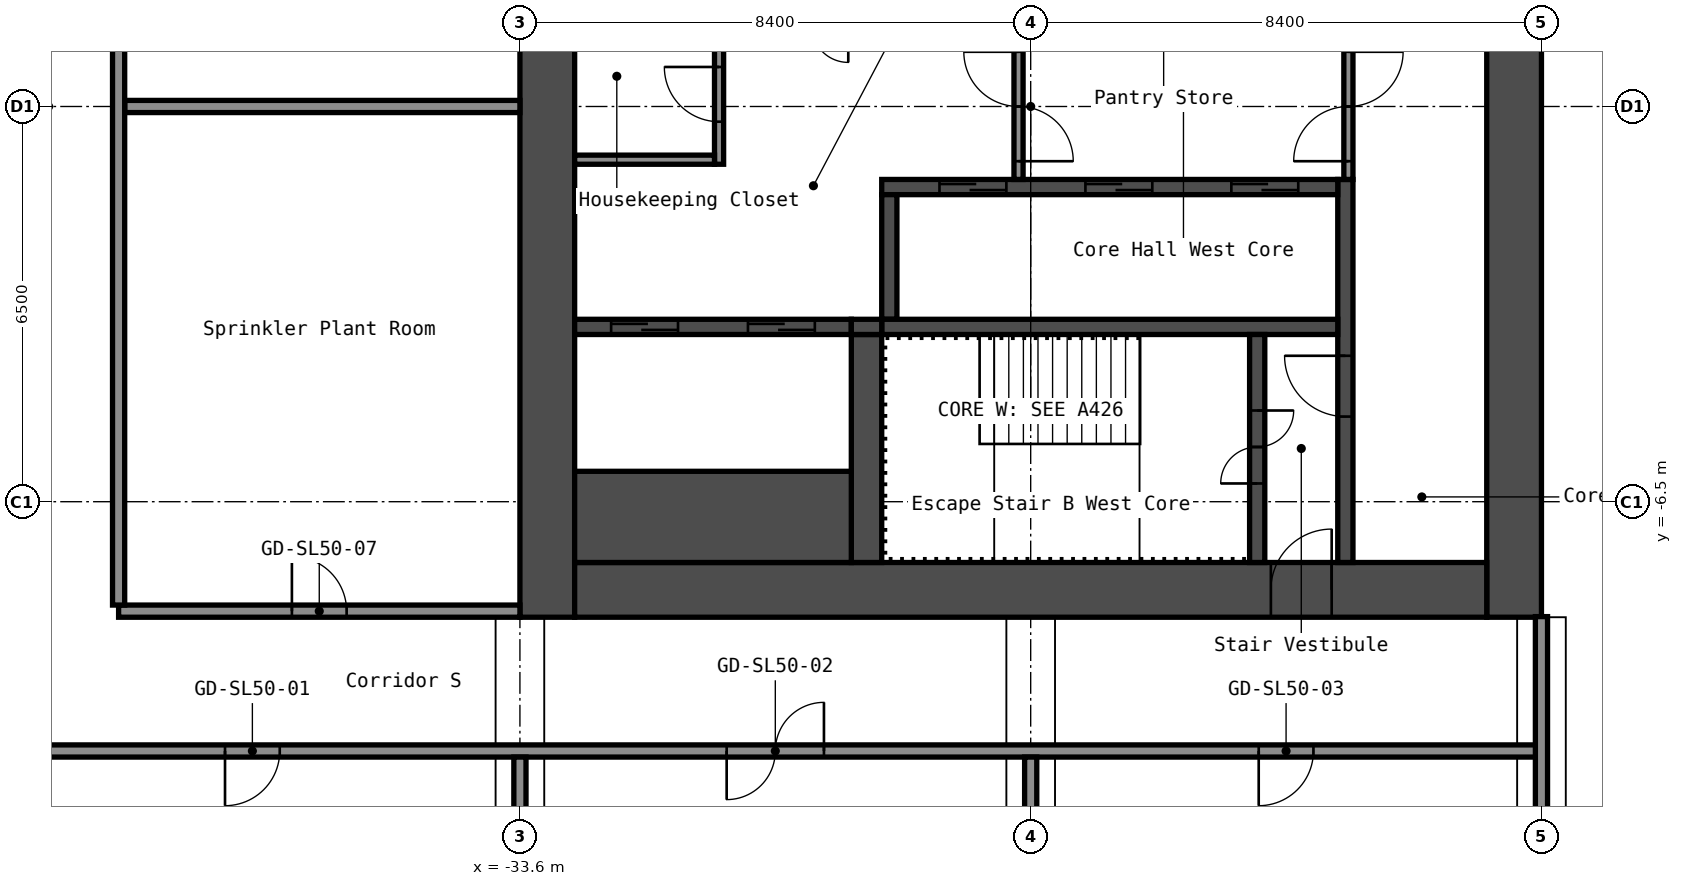
"""IFC4 building model, lengths in metres.
Left out: names, types, materials, properties, quantities, classifications, styles, units other than length and angle.
Written with IfcOpenShell. Run it as: python <this file> out.ifc"""

import sys

from ifc_helpers import new_model, si_unit, direction, frame, frame_2d, origin, place, context, subcontext, project, spatial, rectangle, extrude, element, fill, save


model = new_model("IFC4")
c1 = context("Model", 3, precision=1e-05, world=origin(), true_north=direction((0.0, 1.0)))
c2 = subcontext(c1, "Body", "Model", "MODEL_VIEW")
j1 = project(units=[si_unit("LENGTHUNIT", "METRE"), si_unit("PLANEANGLEUNIT", "RADIAN")], contexts=[c1])
p1 = place(None, origin())
s1 = spatial("IfcSite", under=j1, at=p1, CompositionType="ELEMENT")
p2 = place(p1, origin())
s2 = spatial("IfcBuilding", under=s1, at=p2, CompositionType="ELEMENT")
p3 = place(p2, frame((0.0, 0.0, 175.8)))
s3 = spatial("IfcBuildingStorey", under=s2, at=p3, CompositionType="ELEMENT", Elevation=175.8)
p4 = place(p3, frame((-17.25, -8.4, 0.0), z_axis=(0.0, 0.0, 1.0), x_axis=(0.0, 1.0, 0.0)))
e1 = element("IfcWall", 1, at=p4, inside=s3, PredefinedType="SHEAR", context=c2, shape_type="SweptSolid", body=[
    extrude(rectangle(XDim=16.8, YDim=0.9, at=frame_2d((8.4, 0.0))), origin(), (0.0, 0.0, 1.0), 4.1),
])
p5 = place(p4, frame((10.1, 0.0, 0.0)))
e2 = element("IfcOpeningElement", 2, at=p5, cuts=e1, PredefinedType="OPENING", context=c2, shape_type="SweptSolid", body=[
    extrude(rectangle(XDim=1.6, YDim=2.1, at=frame_2d((0.8, 1.05))), frame((0.0, 0.46, 0.0), z_axis=(0.0, -1.0, 0.0), x_axis=(1.0, 0.0, 0.0)), (0.0, 0.0, 1.0), 0.92),
])
p6 = place(p3, frame((-33.15, -8.4, 0.0), z_axis=(0.0, 0.0, 1.0), x_axis=(0.0, 1.0, 0.0)))
e3 = element("IfcWall", 3, at=p6, inside=s3, PredefinedType="SHEAR", context=c2, shape_type="SweptSolid", body=[
    extrude(rectangle(XDim=16.8, YDim=0.9, at=frame_2d((8.4, 0.0))), origin(), (0.0, 0.0, 1.0), 4.1),
])
p7 = place(p3, frame((-32.7, -7.95, 0.0), z_axis=(0.0, 0.0, 1.0), x_axis=(1.0, 0.0, 0.0)))
e4 = element("IfcWall", 4, at=p7, inside=s3, PredefinedType="SHEAR", context=c2, shape_type="SweptSolid", body=[
    extrude(rectangle(XDim=15.0, YDim=0.9, at=frame_2d((7.5, 0.0))), origin(), (0.0, 0.0, 1.0), 4.1),
])
p8 = place(p7, frame((11.45, 0.0, 0.0)))
e5 = element("IfcOpeningElement", 5, at=p8, cuts=e4, PredefinedType="OPENING", context=c2, shape_type="SweptSolid", body=[
    extrude(rectangle(XDim=1.0, YDim=2.1, at=frame_2d((0.5, 1.05))), frame((0.0, 0.46, 0.0), z_axis=(0.0, -1.0, 0.0), x_axis=(1.0, 0.0, 0.0)), (0.0, 0.0, 1.0), 0.92),
])
p9 = place(p3, frame((-20.025, -7.5, 0.0), z_axis=(0.0, 0.0, 1.0), x_axis=(0.0, 1.0, 0.0)))
e6 = element("IfcWall", 6, at=p9, inside=s3, PredefinedType="SHEAR", context=c2, shape_type="SweptSolid", body=[
    extrude(rectangle(XDim=6.3, YDim=0.25, at=frame_2d((3.15, 0.0))), origin(), (0.0, 0.0, 1.0), 4.1),
])
p10 = place(p9, frame((2.4, 0.0, 0.0)))
e7 = element("IfcOpeningElement", 7, at=p10, cuts=e6, PredefinedType="OPENING", context=c2, shape_type="SweptSolid", body=[
    extrude(rectangle(XDim=1.0, YDim=2.1, at=frame_2d((0.5, 1.05))), frame((0.0, 0.135, 0.0), z_axis=(0.0, -1.0, 0.0), x_axis=(1.0, 0.0, 0.0)), (0.0, 0.0, 1.0), 0.27),
])
p11 = place(p3, frame((-27.65, -1.325, 0.0), z_axis=(0.0, 0.0, 1.0), x_axis=(1.0, 0.0, 0.0)))
e8 = element("IfcWall", 8, at=p11, inside=s3, PredefinedType="SHEAR", context=c2, shape_type="SweptSolid", body=[
    extrude(rectangle(XDim=7.5, YDim=0.25, at=frame_2d((3.75, 0.0))), origin(), (0.0, 0.0, 1.0), 4.1),
])
p12 = place(p11, frame((5.75, 0.0, 0.0)))
e9 = element("IfcOpeningElement", 9, at=p12, cuts=e8, PredefinedType="OPENING", context=c2, shape_type="SweptSolid", body=[
    extrude(rectangle(XDim=1.1, YDim=2.1, at=frame_2d((0.55, 1.05))), frame((0.0, 0.135, 0.0), z_axis=(0.0, -1.0, 0.0), x_axis=(1.0, 0.0, 0.0)), (0.0, 0.0, 1.0), 0.27),
])
p13 = place(p11, frame((3.35, 0.0, 0.0)))
e10 = element("IfcOpeningElement", 10, at=p13, cuts=e8, PredefinedType="OPENING", context=c2, shape_type="SweptSolid", body=[
    extrude(rectangle(XDim=1.1, YDim=2.1, at=frame_2d((0.55, 1.05))), frame((0.0, 0.135, 0.0), z_axis=(0.0, -1.0, 0.0), x_axis=(1.0, 0.0, 0.0)), (0.0, 0.0, 1.0), 0.27),
])
p14 = place(p11, frame((0.95, 0.0, 0.0)))
e11 = element("IfcOpeningElement", 11, at=p14, cuts=e8, PredefinedType="OPENING", context=c2, shape_type="SweptSolid", body=[
    extrude(rectangle(XDim=1.1, YDim=2.1, at=frame_2d((0.55, 1.05))), frame((0.0, 0.135, 0.0), z_axis=(0.0, -1.0, 0.0), x_axis=(1.0, 0.0, 0.0)), (0.0, 0.0, 1.0), 0.27),
])
p15 = place(p3, frame((-27.525, -3.5, 0.0), z_axis=(0.0, 0.0, 1.0), x_axis=(0.0, 1.0, 0.0)))
e12 = element("IfcWall", 12, at=p15, inside=s3, PredefinedType="SHEAR", context=c2, shape_type="SweptSolid", body=[
    extrude(rectangle(XDim=2.05, YDim=0.25, at=frame_2d((1.025, 0.0))), origin(), (0.0, 0.0, 1.0), 4.1),
])
p16 = place(p3, frame((-27.65, -3.625, 0.0), z_axis=(0.0, 0.0, 1.0), x_axis=(1.0, 0.0, 0.0)))
e13 = element("IfcWall", 13, at=p16, inside=s3, PredefinedType="SHEAR", context=c2, shape_type="SweptSolid", body=[
    extrude(rectangle(XDim=7.5, YDim=0.25, at=frame_2d((3.75, 0.0))), origin(), (0.0, 0.0, 1.0), 4.1),
])
p17 = place(p3, frame((-21.475, -7.5, 0.0), z_axis=(0.0, 0.0, 1.0), x_axis=(0.0, 1.0, 0.0)))
e14 = element("IfcWall", 14, at=p17, inside=s3, PredefinedType="SHEAR", context=c2, shape_type="SweptSolid", body=[
    extrude(rectangle(XDim=3.75, YDim=0.25, at=frame_2d((1.875, 0.0))), origin(), (0.0, 0.0, 1.0), 4.1),
])
p18 = place(p17, frame((1.3, 0.0, 0.0)))
e15 = element("IfcOpeningElement", 15, at=p18, cuts=e14, PredefinedType="OPENING", context=c2, shape_type="SweptSolid", body=[
    extrude(rectangle(XDim=1.2, YDim=2.1, at=frame_2d((0.6, 1.05))), frame((0.0, 0.135, 0.0), z_axis=(0.0, -1.0, 0.0), x_axis=(1.0, 0.0, 0.0)), (0.0, 0.0, 1.0), 0.27),
])
p19 = place(p3, frame((-27.9, -7.5, 0.0), z_axis=(0.0, 0.0, 1.0), x_axis=(0.0, 1.0, 0.0)))
e16 = element("IfcWall", 16, at=p19, inside=s3, PredefinedType="SHEAR", context=c2, shape_type="SweptSolid", body=[
    extrude(rectangle(XDim=3.75, YDim=0.5, at=frame_2d((1.875, 0.0))), origin(), (0.0, 0.0, 1.0), 4.1),
])
p20 = place(p3, frame((-32.7, -3.625, 0.0), z_axis=(0.0, 0.0, 1.0), x_axis=(1.0, 0.0, 0.0)))
e17 = element("IfcWall", 17, at=p20, inside=s3, PredefinedType="SHEAR", context=c2, shape_type="SweptSolid", body=[
    extrude(rectangle(XDim=4.55, YDim=0.25, at=frame_2d((2.275, 0.0))), origin(), (0.0, 0.0, 1.0), 4.1),
])
p21 = place(p20, frame((2.85, 0.0, 0.0)))
e18 = element("IfcOpeningElement", 18, at=p21, cuts=e17, PredefinedType="OPENING", context=c2, shape_type="SweptSolid", body=[
    extrude(rectangle(XDim=1.1, YDim=2.1, at=frame_2d((0.55, 1.05))), frame((0.0, 0.135, 0.0), z_axis=(0.0, -1.0, 0.0), x_axis=(1.0, 0.0, 0.0)), (0.0, 0.0, 1.0), 0.27),
])
p22 = place(p20, frame((0.6, 0.0, 0.0)))
e19 = element("IfcOpeningElement", 19, at=p22, cuts=e17, PredefinedType="OPENING", context=c2, shape_type="SweptSolid", body=[
    extrude(rectangle(XDim=1.1, YDim=2.1, at=frame_2d((0.55, 1.05))), frame((0.0, 0.135, 0.0), z_axis=(0.0, -1.0, 0.0), x_axis=(1.0, 0.0, 0.0)), (0.0, 0.0, 1.0), 0.27),
])
p23 = place(p3, frame((-32.7, -6.75, 0.0), z_axis=(0.0, 0.0, 1.0), x_axis=(1.0, 0.0, 0.0)))
e20 = element("IfcWall", 20, at=p23, inside=s3, PredefinedType="SHEAR", context=c2, shape_type="SweptSolid", body=[
    extrude(rectangle(XDim=4.55, YDim=1.5, at=frame_2d((2.275, 0.0))), origin(), (0.0, 0.0, 1.0), 4.1),
])
p24 = place(p3, frame((-28.15, -3.625, 0.0), z_axis=(0.0, 0.0, 1.0), x_axis=(1.0, 0.0, 0.0)))
e21 = element("IfcWall", 21, at=p24, inside=s3, PredefinedType="SHEAR", context=c2, shape_type="SweptSolid", body=[
    extrude(rectangle(XDim=0.5, YDim=0.25, at=frame_2d((0.25, 0.0))), origin(), (0.0, 0.0, 1.0), 4.1),
])
p25 = place(p3, frame((-19.975, -1.2, 0.0), z_axis=(0.0, 0.0, 1.0), x_axis=(0.0, 1.0, 0.0)))
e22 = element("IfcWall", 22, at=p25, inside=s3, PredefinedType="PARTITIONING", context=c2, shape_type="SweptSolid", body=[
    extrude(rectangle(XDim=2.4, YDim=0.15, at=frame_2d((1.2, 0.0))), origin(), (0.0, 0.0, 1.0), 4.1),
])
p26 = place(p25, frame((0.3, 0.0, 0.0)))
e23 = element("IfcOpeningElement", 23, at=p26, cuts=e22, PredefinedType="OPENING", context=c2, shape_type="SweptSolid", body=[
    extrude(rectangle(XDim=1.8, YDim=2.1, at=frame_2d((0.9, 1.05))), frame((0.0, 0.085, 0.0), z_axis=(0.0, -1.0, 0.0), x_axis=(1.0, 0.0, 0.0)), (0.0, 0.0, 1.0), 0.17),
])
p27 = place(p3, frame((-25.4, -1.2, 0.0), z_axis=(0.0, 0.0, 1.0), x_axis=(0.0, 1.0, 0.0)))
e24 = element("IfcWall", 24, at=p27, inside=s3, PredefinedType="PARTITIONING", context=c2, shape_type="SweptSolid", body=[
    extrude(rectangle(XDim=2.4, YDim=0.15, at=frame_2d((1.2, 0.0))), origin(), (0.0, 0.0, 1.0), 4.1),
])
p28 = place(p27, frame((0.3, 0.0, 0.0)))
e25 = element("IfcOpeningElement", 25, at=p28, cuts=e24, PredefinedType="OPENING", context=c2, shape_type="SweptSolid", body=[
    extrude(rectangle(XDim=1.8, YDim=2.1, at=frame_2d((0.9, 1.05))), frame((0.0, 0.085, 0.0), z_axis=(0.0, -1.0, 0.0), x_axis=(1.0, 0.0, 0.0)), (0.0, 0.0, 1.0), 0.17),
])
p29 = place(p3, frame((-30.325, -0.95, 0.0), z_axis=(0.0, 0.0, 1.0), x_axis=(0.0, 1.0, 0.0)))
e26 = element("IfcWall", 26, at=p29, inside=s3, PredefinedType="PARTITIONING", context=c2, shape_type="SweptSolid", body=[
    extrude(rectangle(XDim=2.15, YDim=0.15, at=frame_2d((1.075, 0.0))), origin(), (0.0, 0.0, 1.0), 4.1),
])
p30 = place(p29, frame((0.7, 0.0, 0.0)))
e27 = element("IfcOpeningElement", 27, at=p30, cuts=e26, PredefinedType="OPENING", context=c2, shape_type="SweptSolid", body=[
    extrude(rectangle(XDim=0.9, YDim=2.1, at=frame_2d((0.45, 1.05))), frame((0.0, 0.085, 0.0), z_axis=(0.0, -1.0, 0.0), x_axis=(1.0, 0.0, 0.0)), (0.0, 0.0, 1.0), 0.17),
])
p31 = place(p3, frame((-32.7, -0.875, 0.0), z_axis=(0.0, 0.0, 1.0), x_axis=(1.0, 0.0, 0.0)))
e28 = element("IfcWall", 28, at=p31, inside=s3, PredefinedType="PARTITIONING", context=c2, shape_type="SweptSolid", body=[
    extrude(rectangle(XDim=2.3, YDim=0.15, at=frame_2d((1.15, 0.0))), origin(), (0.0, 0.0, 1.0), 4.1),
])
p32 = place(p3, frame((-42.7, -10.6, 0.0), z_axis=(0.0, 0.0, 1.0), x_axis=(1.0, 0.0, 0.0)))
e29 = element("IfcWall", 29, at=p32, inside=s3, PredefinedType="PARTITIONING", context=c2, shape_type="SweptSolid", body=[
    extrude(rectangle(XDim=25.9, YDim=0.2, at=frame_2d((12.95, 0.0))), origin(), (0.0, 0.0, 1.0), 4.1),
])
p33 = place(p32, frame((4.25, 0.0, 0.0)))
e30 = element("IfcOpeningElement", 30, at=p33, cuts=e29, PredefinedType="OPENING", context=c2, shape_type="SweptSolid", body=[
    extrude(rectangle(XDim=0.9, YDim=2.1, at=frame_2d((0.45, 1.05))), frame((0.0, 0.11, 0.0), z_axis=(0.0, -1.0, 0.0), x_axis=(1.0, 0.0, 0.0)), (0.0, 0.0, 1.0), 0.22),
])
p34 = place(p32, frame((12.5, 0.0, 0.0)))
e31 = element("IfcOpeningElement", 31, at=p34, cuts=e29, PredefinedType="OPENING", context=c2, shape_type="SweptSolid", body=[
    extrude(rectangle(XDim=1.6, YDim=2.1, at=frame_2d((0.8, 1.05))), frame((0.0, 0.11, 0.0), z_axis=(0.0, -1.0, 0.0), x_axis=(1.0, 0.0, 0.0)), (0.0, 0.0, 1.0), 0.22),
])
p35 = place(p32, frame((21.25, 0.0, 0.0)))
e32 = element("IfcOpeningElement", 32, at=p35, cuts=e29, PredefinedType="OPENING", context=c2, shape_type="SweptSolid", body=[
    extrude(rectangle(XDim=0.9, YDim=2.1, at=frame_2d((0.45, 1.05))), frame((0.0, 0.11, 0.0), z_axis=(0.0, -1.0, 0.0), x_axis=(1.0, 0.0, 0.0)), (0.0, 0.0, 1.0), 0.22),
])
p36 = place(p3, frame((-40.2, -8.3, 0.0), z_axis=(0.0, 0.0, 1.0), x_axis=(1.0, 0.0, 0.0)))
e33 = element("IfcWall", 33, at=p36, inside=s3, PredefinedType="PARTITIONING", context=c2, shape_type="SweptSolid", body=[
    extrude(rectangle(XDim=6.6, YDim=0.2, at=frame_2d((3.3, 0.0))), origin(), (0.0, 0.0, 1.0), 4.1),
])
p37 = place(p36, frame((2.85, 0.0, 0.0)))
e34 = element("IfcOpeningElement", 34, at=p37, cuts=e33, PredefinedType="OPENING", context=c2, shape_type="SweptSolid", body=[
    extrude(rectangle(XDim=0.9, YDim=2.1, at=frame_2d((0.45, 1.05))), frame((0.0, 0.11, 0.0), z_axis=(0.0, -1.0, 0.0), x_axis=(1.0, 0.0, 0.0)), (0.0, 0.0, 1.0), 0.22),
])
p38 = place(p3, frame((-40.1, 0.0, 0.0), z_axis=(0.0, 0.0, 1.0), x_axis=(1.0, 0.0, 0.0)))
e35 = element("IfcWall", 35, at=p38, inside=s3, PredefinedType="PARTITIONING", context=c2, shape_type="SweptSolid", body=[
    extrude(rectangle(XDim=6.5, YDim=0.2, at=frame_2d((3.25, 0.0))), origin(), (0.0, 0.0, 1.0), 4.1),
])
p39 = place(p3, frame((-40.2, -8.2, 0.0), z_axis=(0.0, 0.0, 1.0), x_axis=(0.0, 1.0, 0.0)))
e36 = element("IfcWall", 36, at=p39, inside=s3, PredefinedType="PARTITIONING", context=c2, shape_type="SweptSolid", body=[
    extrude(rectangle(XDim=16.4, YDim=0.2, at=frame_2d((8.2, 0.0))), origin(), (0.0, 0.0, 1.0), 4.1),
])
for number, where, z_axis, x_axis in (
    (37, (-33.6, -19.3, 0.0), (0.0, 0.0, 1.0), (0.0, 1.0, 0.0)),
    (38, (-25.2, -19.3, 0.0), (0.0, 0.0, 1.0), (0.0, 1.0, 0.0)),
):
    element("IfcWall", number, at=place(p3, frame(where, z_axis=z_axis, x_axis=x_axis)), inside=s3, PredefinedType="PARTITIONING", context=c2, shape_type="SweptSolid", body=[
        extrude(rectangle(XDim=8.6, YDim=0.2, at=frame_2d((4.3, 0.0))), origin(), (0.0, 0.0, 1.0), 4.1),
    ])
p40 = place(p3, frame((-16.8, -19.3, 0.0), z_axis=(0.0, 0.0, 1.0), x_axis=(0.0, 1.0, 0.0)))
e39 = element("IfcWall", 39, at=p40, inside=s3, PredefinedType="PARTITIONING", context=c2, shape_type="SweptSolid", body=[
    extrude(rectangle(XDim=10.91, YDim=0.2, at=frame_2d((5.455, 0.0))), origin(), (0.0, 0.0, 1.0), 4.1),
])
p41 = place(p8, origin())
e40 = element("IfcDoor", 40, at=p41, inside=s3, OperationType="SINGLE_SWING_LEFT", PredefinedType="DOOR", context=c2, shape_type="SweptSolid", body=[
    extrude(rectangle(XDim=1.0, YDim=2.1, at=frame_2d((0.5, 1.05))), frame((0.0, 0.025, 0.0), z_axis=(0.0, -1.0, 0.0), x_axis=(1.0, 0.0, 0.0)), (0.0, 0.0, 1.0), 0.05),
])
fill(e5, e40)
p42 = place(p18, origin())
e41 = element("IfcDoor", 41, at=p42, inside=s3, OperationType="DOUBLE_DOOR_SINGLE_SWING", PredefinedType="DOOR", context=c2, shape_type="SweptSolid", body=[
    extrude(rectangle(XDim=1.2, YDim=2.1, at=frame_2d((0.6, 1.05))), frame((0.0, 0.025, 0.0), z_axis=(0.0, -1.0, 0.0), x_axis=(1.0, 0.0, 0.0)), (0.0, 0.0, 1.0), 0.05),
])
fill(e15, e41)
p43 = place(p10, origin())
e42 = element("IfcDoor", 42, at=p43, inside=s3, OperationType="SINGLE_SWING_LEFT", PredefinedType="DOOR", context=c2, shape_type="SweptSolid", body=[
    extrude(rectangle(XDim=1.0, YDim=2.1, at=frame_2d((0.5, 1.05))), frame((0.0, 0.025, 0.0), z_axis=(0.0, -1.0, 0.0), x_axis=(1.0, 0.0, 0.0)), (0.0, 0.0, 1.0), 0.05),
])
fill(e7, e42)
p44 = place(p26, origin())
e43 = element("IfcDoor", 43, at=p44, inside=s3, OperationType="DOUBLE_DOOR_SINGLE_SWING", PredefinedType="DOOR", context=c2, shape_type="SweptSolid", body=[
    extrude(rectangle(XDim=1.8, YDim=2.1, at=frame_2d((0.9, 1.05))), frame((0.0, 0.025, 0.0), z_axis=(0.0, -1.0, 0.0), x_axis=(1.0, 0.0, 0.0)), (0.0, 0.0, 1.0), 0.05),
])
fill(e23, e43)
p45 = place(p28, origin())
e44 = element("IfcDoor", 44, at=p45, inside=s3, OperationType="DOUBLE_DOOR_SINGLE_SWING", PredefinedType="DOOR", context=c2, shape_type="SweptSolid", body=[
    extrude(rectangle(XDim=1.8, YDim=2.1, at=frame_2d((0.9, 1.05))), frame((0.0, 0.025, 0.0), z_axis=(0.0, -1.0, 0.0), x_axis=(1.0, 0.0, 0.0)), (0.0, 0.0, 1.0), 0.05),
])
fill(e25, e44)
p46 = place(p30, origin())
e45 = element("IfcDoor", 45, at=p46, inside=s3, OperationType="SINGLE_SWING_LEFT", PredefinedType="DOOR", context=c2, shape_type="SweptSolid", body=[
    extrude(rectangle(XDim=0.9, YDim=2.1, at=frame_2d((0.45, 1.05))), frame((0.0, 0.025, 0.0), z_axis=(0.0, -1.0, 0.0), x_axis=(1.0, 0.0, 0.0)), (0.0, 0.0, 1.0), 0.05),
])
fill(e27, e45)
p47 = place(p12, origin())
e46 = element("IfcDoor", 46, at=p47, inside=s3, OperationType="DOUBLE_DOOR_SLIDING", PredefinedType="DOOR", context=c2, shape_type="SweptSolid", body=[
    extrude(rectangle(XDim=1.1, YDim=2.1, at=frame_2d((0.55, 1.05))), frame((0.0, 0.025, 0.0), z_axis=(0.0, -1.0, 0.0), x_axis=(1.0, 0.0, 0.0)), (0.0, 0.0, 1.0), 0.05),
])
fill(e9, e46)
p48 = place(p13, origin())
e47 = element("IfcDoor", 47, at=p48, inside=s3, OperationType="DOUBLE_DOOR_SLIDING", PredefinedType="DOOR", context=c2, shape_type="SweptSolid", body=[
    extrude(rectangle(XDim=1.1, YDim=2.1, at=frame_2d((0.55, 1.05))), frame((0.0, 0.025, 0.0), z_axis=(0.0, -1.0, 0.0), x_axis=(1.0, 0.0, 0.0)), (0.0, 0.0, 1.0), 0.05),
])
fill(e10, e47)
p49 = place(p14, origin())
e48 = element("IfcDoor", 48, at=p49, inside=s3, OperationType="DOUBLE_DOOR_SLIDING", PredefinedType="DOOR", context=c2, shape_type="SweptSolid", body=[
    extrude(rectangle(XDim=1.1, YDim=2.1, at=frame_2d((0.55, 1.05))), frame((0.0, 0.025, 0.0), z_axis=(0.0, -1.0, 0.0), x_axis=(1.0, 0.0, 0.0)), (0.0, 0.0, 1.0), 0.05),
])
fill(e11, e48)
p50 = place(p21, origin())
e49 = element("IfcDoor", 49, at=p50, inside=s3, OperationType="DOUBLE_DOOR_SLIDING", PredefinedType="DOOR", context=c2, shape_type="SweptSolid", body=[
    extrude(rectangle(XDim=1.1, YDim=2.1, at=frame_2d((0.55, 1.05))), frame((0.0, 0.025, 0.0), z_axis=(0.0, -1.0, 0.0), x_axis=(1.0, 0.0, 0.0)), (0.0, 0.0, 1.0), 0.05),
])
fill(e18, e49)
p51 = place(p22, origin())
e50 = element("IfcDoor", 50, at=p51, inside=s3, OperationType="DOUBLE_DOOR_SLIDING", PredefinedType="DOOR", context=c2, shape_type="SweptSolid", body=[
    extrude(rectangle(XDim=1.1, YDim=2.1, at=frame_2d((0.55, 1.05))), frame((0.0, 0.025, 0.0), z_axis=(0.0, -1.0, 0.0), x_axis=(1.0, 0.0, 0.0)), (0.0, 0.0, 1.0), 0.05),
])
fill(e19, e50)
p52 = place(p33, origin())
e51 = element("IfcDoor", 51, at=p52, inside=s3, OperationType="SINGLE_SWING_LEFT", PredefinedType="DOOR", context=c2, shape_type="SweptSolid", body=[
    extrude(rectangle(XDim=0.9, YDim=2.1, at=frame_2d((0.45, 1.05))), frame((0.0, 0.025, 0.0), z_axis=(0.0, -1.0, 0.0), x_axis=(1.0, 0.0, 0.0)), (0.0, 0.0, 1.0), 0.05),
])
fill(e30, e51)
p53 = place(p34, origin())
e52 = element("IfcDoor", 52, at=p53, inside=s3, OperationType="DOUBLE_DOOR_SINGLE_SWING", PredefinedType="DOOR", context=c2, shape_type="SweptSolid", body=[
    extrude(rectangle(XDim=1.6, YDim=2.1, at=frame_2d((0.8, 1.05))), frame((0.0, 0.025, 0.0), z_axis=(0.0, -1.0, 0.0), x_axis=(1.0, 0.0, 0.0)), (0.0, 0.0, 1.0), 0.05),
])
fill(e31, e52)
p54 = place(p35, origin())
e53 = element("IfcDoor", 53, at=p54, inside=s3, OperationType="SINGLE_SWING_LEFT", PredefinedType="DOOR", context=c2, shape_type="SweptSolid", body=[
    extrude(rectangle(XDim=0.9, YDim=2.1, at=frame_2d((0.45, 1.05))), frame((0.0, 0.025, 0.0), z_axis=(0.0, -1.0, 0.0), x_axis=(1.0, 0.0, 0.0)), (0.0, 0.0, 1.0), 0.05),
])
fill(e32, e53)
p55 = place(p37, origin())
e54 = element("IfcDoor", 54, at=p55, inside=s3, OperationType="SINGLE_SWING_RIGHT", PredefinedType="DOOR", context=c2, shape_type="SweptSolid", body=[
    extrude(rectangle(XDim=0.9, YDim=2.1, at=frame_2d((0.45, 1.05))), frame((0.0, 0.025, 0.0), z_axis=(0.0, -1.0, 0.0), x_axis=(1.0, 0.0, 0.0)), (0.0, 0.0, 1.0), 0.05),
])
fill(e34, e54)
save(model, sys.argv[1])
